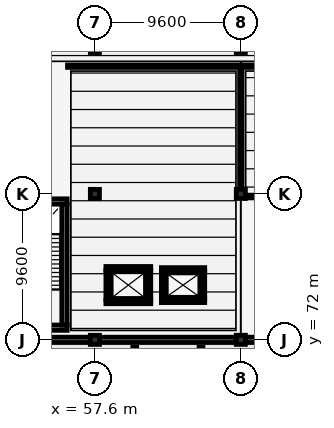
"""IFC4 building model, lengths in metres.
Left out: names, types, materials, properties, quantities, classifications, styles, units other than length and angle.
Written with IfcOpenShell. Run it as: python <this file> out.ifc"""

import sys

from ifc_helpers import new_model, si_unit, direction, frame, frame_2d, origin, origin_2d, place, context, subcontext, project, spatial, rectangle, hollow_rectangle, extrude, element, fill, save


model = new_model("IFC4")
c1 = context("Model", 3, precision=1e-05, world=origin(), true_north=direction((0.0, 1.0)))
c2 = subcontext(c1, "Body", "Model", "MODEL_VIEW")
j1 = project(units=[si_unit("LENGTHUNIT", "METRE"), si_unit("PLANEANGLEUNIT", "RADIAN")], contexts=[c1])
p1 = place(None, origin())
s1 = spatial("IfcSite", under=j1, at=p1, CompositionType="ELEMENT")
p2 = place(p1, origin())
s2 = spatial("IfcBuilding", under=s1, at=p2, CompositionType="ELEMENT")
p3 = place(p2, origin())
s3 = spatial("IfcBuildingStorey", under=s2, at=p3, CompositionType="ELEMENT", Elevation=0.0)
for number, where, z_axis, x_axis in (
    (1, (57.6, 72.0, 0.0), (0.0, 0.0, 1.0), (1.0, 0.0, 0.0)),
    (2, (57.6, 81.6, 0.0), (0.0, 0.0, 1.0), (1.0, 0.0, 0.0)),
    (3, (67.2, 72.0, 0.0), (0.0, 0.0, 1.0), (1.0, 0.0, 0.0)),
    (4, (67.2, 81.6, 0.0), (0.0, 0.0, 1.0), (1.0, 0.0, 0.0)),
):
    element("IfcColumn", number, at=place(p3, frame(where, z_axis=z_axis, x_axis=x_axis)), inside=s3, PredefinedType="COLUMN", context=c2, shape_type="SweptSolid", body=[
        extrude(rectangle(XDim=0.6, YDim=0.6, at=origin_2d()), origin(), (0.0, 0.0, 1.0), 4.8),
    ])
p4 = place(p3, frame((48.3, 72.0, 0.0), z_axis=(0.0, 0.0, 1.0), x_axis=(1.0, 0.0, 0.0)))
e5 = element("IfcWall", 5, at=p4, inside=s3, PredefinedType="SOLIDWALL", context=c2, shape_type="SweptSolid", body=[
    extrude(rectangle(XDim=9.0, YDim=0.35, at=frame_2d((4.5, 0.0))), origin(), (0.0, 0.0, 1.0), 4.1),
])
p5 = place(p4, frame((1.4, 0.0, 0.0)))
e6 = element("IfcOpeningElement", 6, at=p5, cuts=e5, PredefinedType="OPENING", context=c2, shape_type="SweptSolid", body=[
    extrude(rectangle(XDim=2.0, YDim=2.4, at=frame_2d((1.0, 1.2))), frame((0.0, 0.185, 0.0), z_axis=(0.0, -1.0, 0.0), x_axis=(1.0, 0.0, 0.0)), (0.0, 0.0, 1.0), 0.37),
])
p6 = place(p4, frame((5.4, 0.0, 1.1)))
e7 = element("IfcOpeningElement", 7, at=p6, cuts=e5, PredefinedType="OPENING", context=c2, shape_type="SweptSolid", body=[
    extrude(rectangle(XDim=1.38, YDim=1.51, at=frame_2d((0.69, 0.755))), frame((0.0, 0.185, 0.0), z_axis=(0.0, -1.0, 0.0), x_axis=(1.0, 0.0, 0.0)), (0.0, 0.0, 1.0), 0.37),
])
p7 = place(p3, frame((57.9, 72.0, 0.0), z_axis=(0.0, 0.0, 1.0), x_axis=(1.0, 0.0, 0.0)))
e8 = element("IfcWall", 8, at=p7, inside=s3, PredefinedType="SOLIDWALL", context=c2, shape_type="SweptSolid", body=[
    extrude(rectangle(XDim=9.0, YDim=0.35, at=frame_2d((4.5, 0.0))), origin(), (0.0, 0.0, 1.0), 4.1),
])
p8 = place(p7, frame((5.4, 0.0, 1.1)))
e9 = element("IfcOpeningElement", 9, at=p8, cuts=e8, PredefinedType="OPENING", context=c2, shape_type="SweptSolid", body=[
    extrude(rectangle(XDim=1.46, YDim=1.57, at=frame_2d((0.73, 0.785))), frame((0.0, 0.185, 0.0), z_axis=(0.0, -1.0, 0.0), x_axis=(1.0, 0.0, 0.0)), (0.0, 0.0, 1.0), 0.37),
])
p9 = place(p3, frame((67.5, 72.0, 0.0), z_axis=(0.0, 0.0, 1.0), x_axis=(1.0, 0.0, 0.0)))
e10 = element("IfcWall", 10, at=p9, inside=s3, PredefinedType="SOLIDWALL", context=c2, shape_type="SweptSolid", body=[
    extrude(rectangle(XDim=9.0, YDim=0.35, at=frame_2d((4.5, 0.0))), origin(), (0.0, 0.0, 1.0), 4.1),
])
p10 = place(p9, frame((1.4, 0.0, 0.0)))
e11 = element("IfcOpeningElement", 11, at=p10, cuts=e10, PredefinedType="OPENING", context=c2, shape_type="SweptSolid", body=[
    extrude(rectangle(XDim=1.92, YDim=2.34, at=frame_2d((0.96, 1.17))), frame((0.0, 0.185, 0.0), z_axis=(0.0, -1.0, 0.0), x_axis=(1.0, 0.0, 0.0)), (0.0, 0.0, 1.0), 0.37),
])
p11 = place(p9, frame((5.4, 0.0, 1.1)))
e12 = element("IfcOpeningElement", 12, at=p11, cuts=e10, PredefinedType="OPENING", context=c2, shape_type="SweptSolid", body=[
    extrude(rectangle(XDim=1.38, YDim=1.51, at=frame_2d((0.69, 0.755))), frame((0.0, 0.185, 0.0), z_axis=(0.0, -1.0, 0.0), x_axis=(1.0, 0.0, 0.0)), (0.0, 0.0, 1.0), 0.37),
])
for number, where, z_axis, x_axis in (
    (13, (64.58, 71.38, 0.0), (0.0, 0.0, 1.0), (1.0, 0.0, 0.0)),
    (14, (60.22, 71.38, 0.0), (0.0, 0.0, 1.0), (1.0, 0.0, 0.0)),
):
    element("IfcColumn", number, at=place(p3, frame(where, z_axis=z_axis, x_axis=x_axis)), inside=s3, PredefinedType="COLUMN", context=c2, shape_type="SweptSolid", body=[
        extrude(hollow_rectangle(XDim=0.254, YDim=0.254, WallThickness=0.012, at=origin_2d()), origin(), (0.0, 0.0, 1.0), 3.47),
    ])
for number, where, z_axis, x_axis in (
    (15, (55.775, 72.8, 0.0), (0.0, 0.0, 1.0), (-1.0, 0.0, 0.0)),
    (16, (50.125, 81.1, 0.0), (0.0, 0.0, 1.0), (1.0, 0.0, 0.0)),
):
    element("IfcWall", number, at=place(p3, frame(where, z_axis=z_axis, x_axis=x_axis)), inside=s3, PredefinedType="SHEAR", context=c2, shape_type="SweptSolid", body=[
        extrude(rectangle(XDim=5.65, YDim=0.35, at=frame_2d((2.825, 0.0))), origin(), (0.0, 0.0, 1.0), 4.55),
    ])
p12 = place(p3, frame((55.6, 80.925, 0.0), z_axis=(0.0, 0.0, 1.0), x_axis=(0.0, -1.0, 0.0)))
e17 = element("IfcWall", 17, at=p12, inside=s3, PredefinedType="SHEAR", context=c2, shape_type="SweptSolid", body=[
    extrude(rectangle(XDim=7.95, YDim=0.35, at=frame_2d((3.975, 0.0))), origin(), (0.0, 0.0, 1.0), 4.55),
])
p13 = place(p12, frame((5.68, 0.0, 0.0)))
e18 = element("IfcOpeningElement", 18, at=p13, cuts=e17, PredefinedType="OPENING", context=c2, shape_type="SweptSolid", body=[
    extrude(rectangle(XDim=2.05, YDim=2.15, at=frame_2d((1.025, 1.075))), frame((0.0, 0.185, 0.0), z_axis=(0.0, -1.0, 0.0), x_axis=(1.0, 0.0, 0.0)), (0.0, 0.0, 1.0), 0.37),
])
p14 = place(p3, frame((61.275, 74.5, 0.0), z_axis=(0.0, 0.0, 1.0), x_axis=(-1.0, 0.0, 0.0)))
e19 = element("IfcWall", 19, at=p14, inside=s3, PredefinedType="SOLIDWALL", context=c2, shape_type="SweptSolid", body=[
    extrude(rectangle(XDim=2.95, YDim=0.25, at=frame_2d((1.475, 0.0))), origin(), (0.0, 0.0, 1.0), 4.55),
])
p15 = place(p3, frame((58.325, 76.7, 0.0), z_axis=(0.0, 0.0, 1.0), x_axis=(1.0, 0.0, 0.0)))
e20 = element("IfcWall", 20, at=p15, inside=s3, PredefinedType="SOLIDWALL", context=c2, shape_type="SweptSolid", body=[
    extrude(rectangle(XDim=2.95, YDim=0.25, at=frame_2d((1.475, 0.0))), origin(), (0.0, 0.0, 1.0), 4.55),
])
p16 = place(p15, frame((0.925, 0.0, 0.0)))
e21 = element("IfcOpeningElement", 21, at=p16, cuts=e20, PredefinedType="OPENING", context=c2, shape_type="SweptSolid", body=[
    extrude(rectangle(XDim=1.1, YDim=2.15, at=frame_2d((0.55, 1.075))), frame((0.0, 0.135, 0.0), z_axis=(0.0, -1.0, 0.0), x_axis=(1.0, 0.0, 0.0)), (0.0, 0.0, 1.0), 0.27),
])
for number, where, z_axis, x_axis in (
    (22, (58.45, 74.625, 0.0), (0.0, 0.0, 1.0), (0.0, 1.0, 0.0)),
    (23, (61.15, 76.575, 0.0), (0.0, 0.0, 1.0), (0.0, -1.0, 0.0)),
):
    element("IfcWall", number, at=place(p3, frame(where, z_axis=z_axis, x_axis=x_axis)), inside=s3, PredefinedType="SOLIDWALL", context=c2, shape_type="SweptSolid", body=[
        extrude(rectangle(XDim=1.95, YDim=0.25, at=frame_2d((0.975, 0.0))), origin(), (0.0, 0.0, 1.0), 4.55),
    ])
p17 = place(p3, frame((64.825, 74.575, 0.0), z_axis=(0.0, 0.0, 1.0), x_axis=(-1.0, 0.0, 0.0)))
e24 = element("IfcWall", 24, at=p17, inside=s3, PredefinedType="SOLIDWALL", context=c2, shape_type="SweptSolid", body=[
    extrude(rectangle(XDim=2.85, YDim=0.25, at=frame_2d((1.425, 0.0))), origin(), (0.0, 0.0, 1.0), 4.55),
])
p18 = place(p3, frame((61.975, 76.625, 0.0), z_axis=(0.0, 0.0, 1.0), x_axis=(1.0, 0.0, 0.0)))
e25 = element("IfcWall", 25, at=p18, inside=s3, PredefinedType="SOLIDWALL", context=c2, shape_type="SweptSolid", body=[
    extrude(rectangle(XDim=2.85, YDim=0.25, at=frame_2d((1.425, 0.0))), origin(), (0.0, 0.0, 1.0), 4.55),
])
p19 = place(p18, frame((0.875, 0.0, 0.0)))
e26 = element("IfcOpeningElement", 26, at=p19, cuts=e25, PredefinedType="OPENING", context=c2, shape_type="SweptSolid", body=[
    extrude(rectangle(XDim=1.1, YDim=2.15, at=frame_2d((0.55, 1.075))), frame((0.0, 0.135, 0.0), z_axis=(0.0, -1.0, 0.0), x_axis=(1.0, 0.0, 0.0)), (0.0, 0.0, 1.0), 0.27),
])
for number, where, z_axis, x_axis in (
    (27, (62.1, 74.7, 0.0), (0.0, 0.0, 1.0), (0.0, 1.0, 0.0)),
    (28, (64.7, 76.5, 0.0), (0.0, 0.0, 1.0), (0.0, -1.0, 0.0)),
):
    element("IfcWall", number, at=place(p3, frame(where, z_axis=z_axis, x_axis=x_axis)), inside=s3, PredefinedType="SOLIDWALL", context=c2, shape_type="SweptSolid", body=[
        extrude(rectangle(XDim=1.8, YDim=0.25, at=frame_2d((0.9, 0.0))), origin(), (0.0, 0.0, 1.0), 4.55),
    ])
p20 = place(p3, frame((67.2, 81.4, 0.0), z_axis=(0.0, 0.0, 1.0), x_axis=(0.0, 1.0, 0.0)))
e29 = element("IfcWall", 29, at=p20, inside=s3, PredefinedType="PARTITIONING", context=c2, shape_type="SweptSolid", body=[
    extrude(rectangle(XDim=8.5, YDim=0.16, at=frame_2d((4.25, 0.0))), origin(), (0.0, 0.0, 1.0), 3.92),
])
p21 = place(p20, frame((3.675, 0.0, 0.0)))
e30 = element("IfcOpeningElement", 30, at=p21, cuts=e29, PredefinedType="OPENING", context=c2, shape_type="SweptSolid", body=[
    extrude(rectangle(XDim=1.15, YDim=2.2, at=frame_2d((0.575, 1.1))), frame((0.0, 0.09, 0.0), z_axis=(0.0, -1.0, 0.0), x_axis=(1.0, 0.0, 0.0)), (0.0, 0.0, 1.0), 0.18),
])
p22 = place(p3, frame((55.8, 90.0, 0.0), z_axis=(0.0, 0.0, 1.0), x_axis=(1.0, 0.0, 0.0)))
e31 = element("IfcWall", 31, at=p22, inside=s3, PredefinedType="PARTITIONING", context=c2, shape_type="SweptSolid", body=[
    extrude(rectangle(XDim=11.3, YDim=0.16, at=frame_2d((5.65, 0.0))), origin(), (0.0, 0.0, 1.0), 4.42),
])
p23 = place(p22, frame((4.75, 0.0, 0.0)))
e32 = element("IfcOpeningElement", 32, at=p23, cuts=e31, PredefinedType="OPENING", context=c2, shape_type="SweptSolid", body=[
    extrude(rectangle(XDim=1.8, YDim=2.15, at=frame_2d((0.9, 1.075))), frame((0.0, 0.09, 0.0), z_axis=(0.0, -1.0, 0.0), x_axis=(1.0, 0.0, 0.0)), (0.0, 0.0, 1.0), 0.18),
])
p24 = place(p3, frame((67.3, 90.0, 0.0), z_axis=(0.0, 0.0, 1.0), x_axis=(1.0, 0.0, 0.0)))
e33 = element("IfcWall", 33, at=p24, inside=s3, PredefinedType="PARTITIONING", context=c2, shape_type="SweptSolid", body=[
    extrude(rectangle(XDim=9.4, YDim=0.16, at=frame_2d((4.7, 0.0))), origin(), (0.0, 0.0, 1.0), 4.42),
])
p25 = place(p24, frame((4.125, 0.0, 0.0)))
e34 = element("IfcOpeningElement", 34, at=p25, cuts=e33, PredefinedType="OPENING", context=c2, shape_type="SweptSolid", body=[
    extrude(rectangle(XDim=1.15, YDim=2.2, at=frame_2d((0.575, 1.1))), frame((0.0, 0.09, 0.0), z_axis=(0.0, -1.0, 0.0), x_axis=(1.0, 0.0, 0.0)), (0.0, 0.0, 1.0), 0.18),
])
p26 = place(p3, frame((67.44, 81.4, 0.0), z_axis=(0.0, 0.0, 1.0), x_axis=(1.0, 0.0, 0.0)))
e35 = element("IfcWall", 35, at=p26, inside=s3, PredefinedType="PARTITIONING", context=c2, shape_type="SweptSolid", body=[
    extrude(rectangle(XDim=1.345, YDim=0.125, at=frame_2d((0.672, 0.0))), origin(), (0.0, 0.0, 1.0), 3.841),
])
p27 = place(p6, origin())
e36 = element("IfcWindow", 36, at=p27, inside=s3, PartitioningType="SINGLE_PANEL", PredefinedType="WINDOW", context=c2, shape_type="SweptSolid", body=[
    extrude(rectangle(XDim=1.38, YDim=1.51, at=frame_2d((0.69, 0.755))), frame((0.0, 0.03, 0.0), z_axis=(0.0, -1.0, 0.0), x_axis=(1.0, 0.0, 0.0)), (0.0, 0.0, 1.0), 0.06),
])
fill(e7, e36)
p28 = place(p8, origin())
e37 = element("IfcWindow", 37, at=p28, inside=s3, PartitioningType="SINGLE_PANEL", PredefinedType="WINDOW", context=c2, shape_type="SweptSolid", body=[
    extrude(rectangle(XDim=1.46, YDim=1.57, at=frame_2d((0.73, 0.785))), frame((0.0, 0.03, 0.0), z_axis=(0.0, -1.0, 0.0), x_axis=(1.0, 0.0, 0.0)), (0.0, 0.0, 1.0), 0.06),
])
fill(e9, e37)
p29 = place(p13, origin())
e38 = element("IfcDoor", 38, at=p29, inside=s3, OperationType="DOUBLE_DOOR_SINGLE_SWING", PredefinedType="DOOR", context=c2, shape_type="SweptSolid", body=[
    extrude(rectangle(XDim=2.05, YDim=2.15, at=frame_2d((1.025, 1.075))), frame((0.0, 0.025, 0.0), z_axis=(0.0, -1.0, 0.0), x_axis=(1.0, 0.0, 0.0)), (0.0, 0.0, 1.0), 0.05),
])
fill(e18, e38)
p30 = place(p16, origin())
e39 = element("IfcDoor", 39, at=p30, inside=s3, OperationType="DOUBLE_DOOR_SLIDING", PredefinedType="DOOR", context=c2, shape_type="SweptSolid", body=[
    extrude(rectangle(XDim=1.1, YDim=2.15, at=frame_2d((0.55, 1.075))), frame((0.0, 0.025, 0.0), z_axis=(0.0, -1.0, 0.0), x_axis=(1.0, 0.0, 0.0)), (0.0, 0.0, 1.0), 0.05),
])
fill(e21, e39)
p31 = place(p19, origin())
e40 = element("IfcDoor", 40, at=p31, inside=s3, OperationType="DOUBLE_DOOR_SLIDING", PredefinedType="DOOR", context=c2, shape_type="SweptSolid", body=[
    extrude(rectangle(XDim=1.1, YDim=2.15, at=frame_2d((0.55, 1.075))), frame((0.0, 0.025, 0.0), z_axis=(0.0, -1.0, 0.0), x_axis=(1.0, 0.0, 0.0)), (0.0, 0.0, 1.0), 0.05),
])
fill(e26, e40)
p32 = place(p21, origin())
e41 = element("IfcDoor", 41, at=p32, inside=s3, OperationType="SINGLE_SWING_LEFT", PredefinedType="DOOR", context=c2, shape_type="SweptSolid", body=[
    extrude(rectangle(XDim=1.15, YDim=2.2, at=frame_2d((0.575, 1.1))), frame((0.0, 0.025, 0.0), z_axis=(0.0, -1.0, 0.0), x_axis=(1.0, 0.0, 0.0)), (0.0, 0.0, 1.0), 0.05),
])
fill(e30, e41)
p33 = place(p23, origin())
e42 = element("IfcDoor", 42, at=p33, inside=s3, OperationType="DOUBLE_DOOR_SINGLE_SWING", PredefinedType="DOOR", context=c2, shape_type="SweptSolid", body=[
    extrude(rectangle(XDim=1.8, YDim=2.15, at=frame_2d((0.9, 1.075))), frame((0.0, 0.025, 0.0), z_axis=(0.0, -1.0, 0.0), x_axis=(1.0, 0.0, 0.0)), (0.0, 0.0, 1.0), 0.05),
])
fill(e32, e42)
save(model, sys.argv[1])
